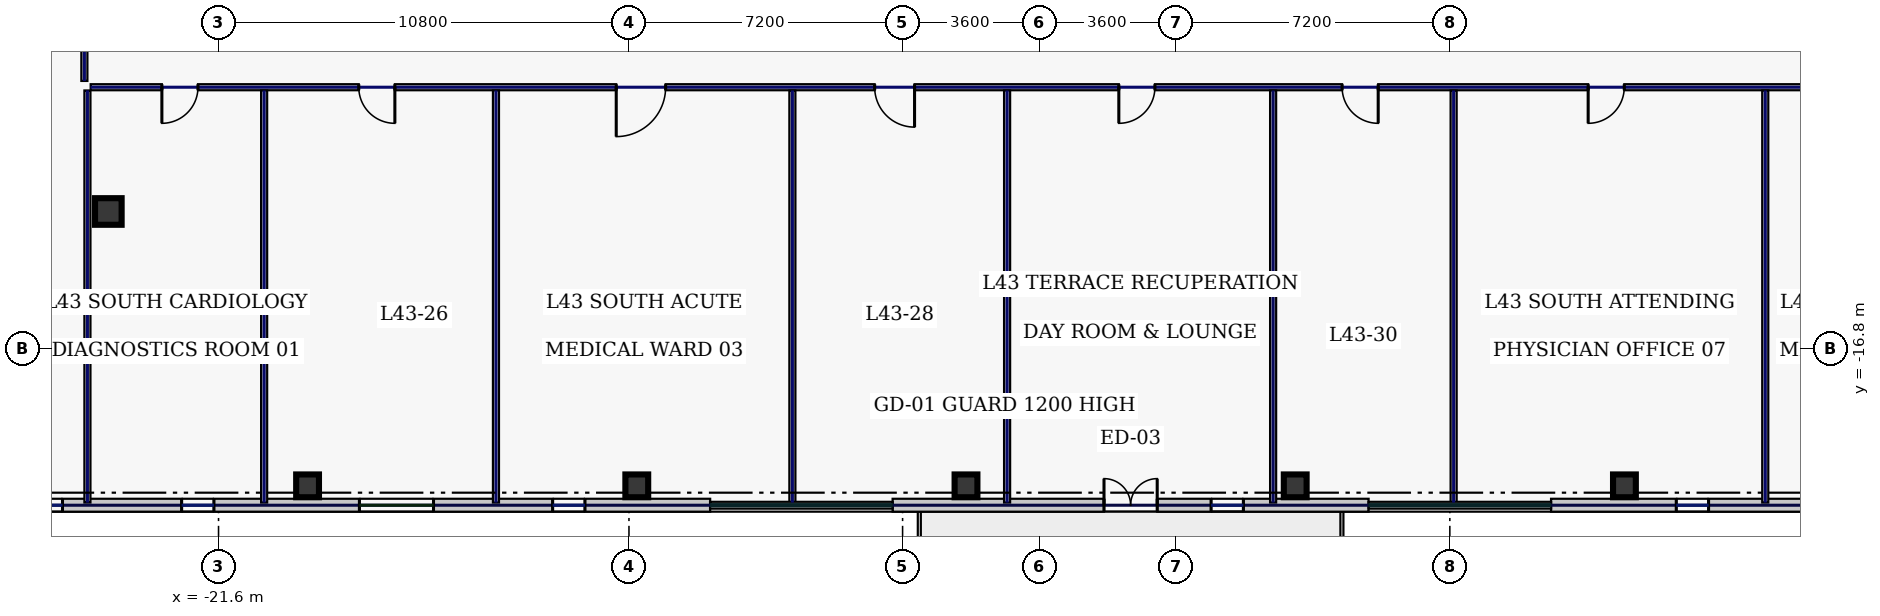
"""IFC4 building model, lengths in metres.
Left out: names, types, materials, properties, quantities, classifications, styles, units other than length and angle.
Written with IfcOpenShell. Run it as: python <this file> out.ifc"""

import sys

from ifc_helpers import new_model, si_unit, direction, frame, frame_2d, origin, origin_2d, place, context, subcontext, project, spatial, rectangle, hollow_rectangle, extrude, element, fill, save


model = new_model("IFC4")
c1 = context("Model", 3, precision=1e-05, world=origin(), true_north=direction((0.0, 1.0)))
c2 = subcontext(c1, "Body", "Model", "MODEL_VIEW")
j1 = project(units=[si_unit("LENGTHUNIT", "METRE"), si_unit("PLANEANGLEUNIT", "RADIAN")], contexts=[c1])
p1 = place(None, origin())
s1 = spatial("IfcSite", under=j1, at=p1, CompositionType="ELEMENT")
p2 = place(p1, origin())
s2 = spatial("IfcBuilding", under=s1, at=p2, CompositionType="ELEMENT")
p3 = place(p2, frame((0.0, 0.0, 188.2)))
s3 = spatial("IfcBuildingStorey", under=s2, at=p3, CompositionType="ELEMENT", Elevation=188.2)
p4 = place(p3, frame((-24.5, -13.2, 0.0), z_axis=(0.0, 0.0, 1.0), x_axis=(1.0, 0.0, 0.0)))
e1 = element("IfcColumn", 1, at=p4, inside=s3, PredefinedType="COLUMN", context=c2, shape_type="SweptSolid", body=[
    extrude(hollow_rectangle(XDim=0.7, YDim=0.7, WallThickness=0.032, at=origin_2d()), origin(), (0.0, 0.0, 1.0), 3.74),
])
for number, where, z_axis, x_axis in (
    (2, (-19.257, -20.42, 0.0), (0.0, 0.0, 1.0), (1.0, 0.0, 0.0)),
    (3, (-10.594, -20.42, 0.0), (0.0, 0.0, 1.0), (1.0, 0.0, 0.0)),
    (4, (-1.931, -20.42, 0.0), (0.0, 0.0, 1.0), (1.0, 0.0, 0.0)),
    (5, (6.731, -20.42, 0.0), (0.0, 0.0, 1.0), (1.0, 0.0, 0.0)),
    (6, (15.394, -20.42, 0.0), (0.0, 0.0, 1.0), (1.0, 0.0, 0.0)),
):
    element("IfcColumn", number, at=place(p3, frame(where, z_axis=z_axis, x_axis=x_axis)), inside=s3, PredefinedType="COLUMN", context=c2, shape_type="SweptSolid", body=[
        extrude(hollow_rectangle(XDim=0.6, YDim=0.6, WallThickness=0.028, at=origin_2d()), origin(), (0.0, 0.0, 1.0), 3.74),
    ])
p5 = place(p3, frame((-28.6, -20.93, 0.0), z_axis=(0.0, 0.0, 1.0), x_axis=(1.0, 0.0, 0.0)))
e7 = element("IfcWall", 7, at=p5, inside=s3, PredefinedType="STANDARD", context=c2, shape_type="SweptSolid", body=[
    extrude(rectangle(XDim=19.937, YDim=0.34, at=frame_2d((9.969, 0.0))), origin(), (0.0, 0.0, 1.0), 3.74),
])
p6 = place(p5, frame((2.044, 0.0, 0.8)))
e8 = element("IfcOpeningElement", 8, at=p6, cuts=e7, PredefinedType="OPENING", context=c2, shape_type="SweptSolid", body=[
    extrude(rectangle(XDim=0.85, YDim=1.85, at=frame_2d((0.425, 0.925))), frame((0.0, 0.18, 0.0), z_axis=(0.0, -1.0, 0.0), x_axis=(1.0, 0.0, 0.0)), (0.0, 0.0, 1.0), 0.36),
])
p7 = place(p5, frame((6.029, 0.0, 0.8)))
e9 = element("IfcOpeningElement", 9, at=p7, cuts=e7, PredefinedType="OPENING", context=c2, shape_type="SweptSolid", body=[
    extrude(rectangle(XDim=0.85, YDim=1.85, at=frame_2d((0.425, 0.925))), frame((0.0, 0.18, 0.0), z_axis=(0.0, -1.0, 0.0), x_axis=(1.0, 0.0, 0.0)), (0.0, 0.0, 1.0), 0.36),
])
p8 = place(p5, frame((10.707, 0.0, 0.8)))
e10 = element("IfcOpeningElement", 10, at=p8, cuts=e7, PredefinedType="OPENING", context=c2, shape_type="SweptSolid", body=[
    extrude(rectangle(XDim=1.95, YDim=2.1, at=frame_2d((0.975, 1.05))), frame((0.0, 0.18, 0.0), z_axis=(0.0, -1.0, 0.0), x_axis=(1.0, 0.0, 0.0)), (0.0, 0.0, 1.0), 0.36),
])
p9 = place(p5, frame((15.792, 0.0, 0.8)))
e11 = element("IfcOpeningElement", 11, at=p9, cuts=e7, PredefinedType="OPENING", context=c2, shape_type="SweptSolid", body=[
    extrude(rectangle(XDim=0.85, YDim=1.85, at=frame_2d((0.425, 0.925))), frame((0.0, 0.18, 0.0), z_axis=(0.0, -1.0, 0.0), x_axis=(1.0, 0.0, 0.0)), (0.0, 0.0, 1.0), 0.36),
])
p10 = place(p3, frame((-3.863, -20.93, 0.0), z_axis=(0.0, 0.0, 1.0), x_axis=(1.0, 0.0, 0.0)))
e12 = element("IfcWall", 12, at=p10, inside=s3, PredefinedType="STANDARD", context=c2, shape_type="SweptSolid", body=[
    extrude(rectangle(XDim=12.526, YDim=0.34, at=frame_2d((6.263, 0.0))), origin(), (0.0, 0.0, 1.0), 3.74),
])
p11 = place(p10, frame((5.563, 0.0, 0.0)))
e13 = element("IfcOpeningElement", 13, at=p11, cuts=e12, PredefinedType="OPENING", context=c2, shape_type="SweptSolid", body=[
    extrude(rectangle(XDim=1.4, YDim=2.2, at=frame_2d((0.7, 1.1))), frame((0.0, 0.18, 0.0), z_axis=(0.0, -1.0, 0.0), x_axis=(1.0, 0.0, 0.0)), (0.0, 0.0, 1.0), 0.36),
])
p12 = place(p10, frame((8.38, 0.0, 0.8)))
e14 = element("IfcOpeningElement", 14, at=p12, cuts=e12, PredefinedType="OPENING", context=c2, shape_type="SweptSolid", body=[
    extrude(rectangle(XDim=0.85, YDim=1.85, at=frame_2d((0.425, 0.925))), frame((0.0, 0.18, 0.0), z_axis=(0.0, -1.0, 0.0), x_axis=(1.0, 0.0, 0.0)), (0.0, 0.0, 1.0), 0.36),
])
p13 = place(p3, frame((13.463, -20.93, 0.0), z_axis=(0.0, 0.0, 1.0), x_axis=(1.0, 0.0, 0.0)))
e15 = element("IfcWall", 15, at=p13, inside=s3, PredefinedType="STANDARD", context=c2, shape_type="SweptSolid", body=[
    extrude(rectangle(XDim=19.937, YDim=0.34, at=frame_2d((9.969, 0.0))), origin(), (0.0, 0.0, 1.0), 3.74),
])
p14 = place(p13, frame((3.295, 0.0, 0.8)))
e16 = element("IfcOpeningElement", 16, at=p14, cuts=e15, PredefinedType="OPENING", context=c2, shape_type="SweptSolid", body=[
    extrude(rectangle(XDim=0.85, YDim=1.85, at=frame_2d((0.425, 0.925))), frame((0.0, 0.18, 0.0), z_axis=(0.0, -1.0, 0.0), x_axis=(1.0, 0.0, 0.0)), (0.0, 0.0, 1.0), 0.36),
])
p15 = place(p13, frame((7.28, 0.0, 0.8)))
e17 = element("IfcOpeningElement", 17, at=p15, cuts=e15, PredefinedType="OPENING", context=c2, shape_type="SweptSolid", body=[
    extrude(rectangle(XDim=1.95, YDim=2.1, at=frame_2d((0.975, 1.05))), frame((0.0, 0.18, 0.0), z_axis=(0.0, -1.0, 0.0), x_axis=(1.0, 0.0, 0.0)), (0.0, 0.0, 1.0), 0.36),
])
p16 = place(p13, frame((13.058, 0.0, 0.8)))
e18 = element("IfcOpeningElement", 18, at=p16, cuts=e15, PredefinedType="OPENING", context=c2, shape_type="SweptSolid", body=[
    extrude(rectangle(XDim=0.85, YDim=1.85, at=frame_2d((0.425, 0.925))), frame((0.0, 0.18, 0.0), z_axis=(0.0, -1.0, 0.0), x_axis=(1.0, 0.0, 0.0)), (0.0, 0.0, 1.0), 0.36),
])
p17 = place(p13, frame((15.943, 0.0, 0.8)))
e19 = element("IfcOpeningElement", 19, at=p17, cuts=e15, PredefinedType="OPENING", context=c2, shape_type="SweptSolid", body=[
    extrude(rectangle(XDim=1.95, YDim=2.1, at=frame_2d((0.975, 1.05))), frame((0.0, 0.18, 0.0), z_axis=(0.0, -1.0, 0.0), x_axis=(1.0, 0.0, 0.0)), (0.0, 0.0, 1.0), 0.36),
])
p18 = place(p3, frame((-25.13, -9.765, 0.0), z_axis=(0.0, 0.0, 1.0), x_axis=(0.0, 1.0, 0.0)))
e20 = element("IfcWall", 20, at=p18, inside=s3, PredefinedType="PARTITIONING", context=c2, shape_type="SweptSolid", body=[
    extrude(rectangle(XDim=2.98, YDim=0.16, at=frame_2d((1.49, 0.0))), origin(), (0.0, 0.0, 1.0), 3.74),
])
p19 = place(p18, frame((1.1, 0.0, 0.0)))
e21 = element("IfcOpeningElement", 21, at=p19, cuts=e20, PredefinedType="OPENING", context=c2, shape_type="SweptSolid", body=[
    extrude(rectangle(XDim=0.95, YDim=2.2, at=frame_2d((0.475, 1.1))), frame((0.0, 0.09, 0.0), z_axis=(0.0, -1.0, 0.0), x_axis=(1.0, 0.0, 0.0)), (0.0, 0.0, 1.0), 0.18),
])
p20 = place(p3, frame((24.965, -9.93, 0.0), z_axis=(0.0, 0.0, 1.0), x_axis=(-1.0, 0.0, 0.0)))
e22 = element("IfcWall", 22, at=p20, inside=s3, PredefinedType="PARTITIONING", context=c2, shape_type="SweptSolid", body=[
    extrude(rectangle(XDim=49.93, YDim=0.16, at=frame_2d((24.965, 0.0))), origin(), (0.0, 0.0, 1.0), 3.74),
])
p21 = place(p20, frame((47.106, 0.0, 0.0)))
e23 = element("IfcOpeningElement", 23, at=p21, cuts=e22, PredefinedType="OPENING", context=c2, shape_type="SweptSolid", body=[
    extrude(rectangle(XDim=0.95, YDim=2.2, at=frame_2d((0.475, 1.1))), frame((0.0, 0.09, 0.0), z_axis=(0.0, -1.0, 0.0), x_axis=(1.0, 0.0, 0.0)), (0.0, 0.0, 1.0), 0.18),
])
p22 = place(p20, frame((41.925, 0.0, 0.0)))
e24 = element("IfcOpeningElement", 24, at=p22, cuts=e22, PredefinedType="OPENING", context=c2, shape_type="SweptSolid", body=[
    extrude(rectangle(XDim=0.95, YDim=2.2, at=frame_2d((0.475, 1.1))), frame((0.0, 0.09, 0.0), z_axis=(0.0, -1.0, 0.0), x_axis=(1.0, 0.0, 0.0)), (0.0, 0.0, 1.0), 0.18),
])
p23 = place(p20, frame((34.8, 0.0, 0.0)))
e25 = element("IfcOpeningElement", 25, at=p23, cuts=e22, PredefinedType="OPENING", context=c2, shape_type="SweptSolid", body=[
    extrude(rectangle(XDim=1.3, YDim=2.2, at=frame_2d((0.65, 1.1))), frame((0.0, 0.09, 0.0), z_axis=(0.0, -1.0, 0.0), x_axis=(1.0, 0.0, 0.0)), (0.0, 0.0, 1.0), 0.18),
])
p24 = place(p20, frame((28.25, 0.0, 0.0)))
e26 = element("IfcOpeningElement", 26, at=p24, cuts=e22, PredefinedType="OPENING", context=c2, shape_type="SweptSolid", body=[
    extrude(rectangle(XDim=1.05, YDim=2.2, at=frame_2d((0.525, 1.1))), frame((0.0, 0.09, 0.0), z_axis=(0.0, -1.0, 0.0), x_axis=(1.0, 0.0, 0.0)), (0.0, 0.0, 1.0), 0.18),
])
p25 = place(p20, frame((21.925, 0.0, 0.0)))
e27 = element("IfcOpeningElement", 27, at=p25, cuts=e22, PredefinedType="OPENING", context=c2, shape_type="SweptSolid", body=[
    extrude(rectangle(XDim=0.95, YDim=2.2, at=frame_2d((0.475, 1.1))), frame((0.0, 0.09, 0.0), z_axis=(0.0, -1.0, 0.0), x_axis=(1.0, 0.0, 0.0)), (0.0, 0.0, 1.0), 0.18),
])
p26 = place(p20, frame((16.05, 0.0, 0.0)))
e28 = element("IfcOpeningElement", 28, at=p26, cuts=e22, PredefinedType="OPENING", context=c2, shape_type="SweptSolid", body=[
    extrude(rectangle(XDim=0.95, YDim=2.2, at=frame_2d((0.475, 1.1))), frame((0.0, 0.09, 0.0), z_axis=(0.0, -1.0, 0.0), x_axis=(1.0, 0.0, 0.0)), (0.0, 0.0, 1.0), 0.18),
])
p27 = place(p20, frame((9.575, 0.0, 0.0)))
e29 = element("IfcOpeningElement", 29, at=p27, cuts=e22, PredefinedType="OPENING", context=c2, shape_type="SweptSolid", body=[
    extrude(rectangle(XDim=0.95, YDim=2.2, at=frame_2d((0.475, 1.1))), frame((0.0, 0.09, 0.0), z_axis=(0.0, -1.0, 0.0), x_axis=(1.0, 0.0, 0.0)), (0.0, 0.0, 1.0), 0.18),
])
p28 = place(p20, frame((2.519, 0.0, 0.0)))
e30 = element("IfcOpeningElement", 30, at=p28, cuts=e22, PredefinedType="OPENING", context=c2, shape_type="SweptSolid", body=[
    extrude(rectangle(XDim=1.3, YDim=2.2, at=frame_2d((0.65, 1.1))), frame((0.0, 0.09, 0.0), z_axis=(0.0, -1.0, 0.0), x_axis=(1.0, 0.0, 0.0)), (0.0, 0.0, 1.0), 0.18),
])
for number, where, z_axis, x_axis in (
    (31, (-25.05, -20.86, 0.0), (0.0, 0.0, 1.0), (0.0, 1.0, 0.0)),
    (32, (-20.4, -20.86, 0.0), (0.0, 0.0, 1.0), (0.0, 1.0, 0.0)),
    (33, (-14.3, -20.86, 0.0), (0.0, 0.0, 1.0), (0.0, 1.0, 0.0)),
    (34, (-6.5, -20.86, 0.0), (0.0, 0.0, 1.0), (0.0, 1.0, 0.0)),
    (35, (-0.85, -20.86, 0.0), (0.0, 0.0, 1.0), (0.0, 1.0, 0.0)),
):
    element("IfcWall", number, at=place(p3, frame(where, z_axis=z_axis, x_axis=x_axis)), inside=s3, PredefinedType="PARTITIONING", context=c2, shape_type="SweptSolid", body=[
        extrude(rectangle(XDim=10.845, YDim=0.16, at=frame_2d((5.423, 0.0))), origin(), (0.0, 0.0, 1.0), 3.74),
    ])
p29 = place(p3, frame((6.15, -20.86, 0.0), z_axis=(0.0, 0.0, 1.0), x_axis=(0.0, 1.0, 0.0)))
e36 = element("IfcWall", 36, at=p29, inside=s3, PredefinedType="PARTITIONING", context=c2, shape_type="SweptSolid", body=[
    extrude(rectangle(XDim=10.845, YDim=0.16, at=frame_2d((5.423, 0.0))), origin(), (0.0, 0.0, 1.0), 3.285),
])
for number, where, z_axis, x_axis in (
    (37, (10.9, -20.86, 0.0), (0.0, 0.0, 1.0), (0.0, 1.0, 0.0)),
    (38, (19.1, -20.86, 0.0), (0.0, 0.0, 1.0), (0.0, 1.0, 0.0)),
):
    element("IfcWall", number, at=place(p3, frame(where, z_axis=z_axis, x_axis=x_axis)), inside=s3, PredefinedType="PARTITIONING", context=c2, shape_type="SweptSolid", body=[
        extrude(rectangle(XDim=10.845, YDim=0.16, at=frame_2d((5.423, 0.0))), origin(), (0.0, 0.0, 1.0), 3.74),
    ])
p30 = place(p6, origin())
e39 = element("IfcWindow", 39, at=p30, inside=s3, PartitioningType="SINGLE_PANEL", PredefinedType="WINDOW", context=c2, shape_type="SweptSolid", body=[
    extrude(rectangle(XDim=0.85, YDim=1.85, at=frame_2d((0.425, 0.925))), frame((0.0, 0.03, 0.0), z_axis=(0.0, -1.0, 0.0), x_axis=(1.0, 0.0, 0.0)), (0.0, 0.0, 1.0), 0.06),
])
fill(e8, e39)
p31 = place(p7, origin())
e40 = element("IfcWindow", 40, at=p31, inside=s3, PartitioningType="SINGLE_PANEL", PredefinedType="WINDOW", context=c2, shape_type="SweptSolid", body=[
    extrude(rectangle(XDim=0.85, YDim=1.85, at=frame_2d((0.425, 0.925))), frame((0.0, 0.03, 0.0), z_axis=(0.0, -1.0, 0.0), x_axis=(1.0, 0.0, 0.0)), (0.0, 0.0, 1.0), 0.06),
])
fill(e9, e40)
p32 = place(p8, origin())
e41 = element("IfcWindow", 41, at=p32, inside=s3, PartitioningType="SINGLE_PANEL", PredefinedType="WINDOW", context=c2, shape_type="SweptSolid", body=[
    extrude(rectangle(XDim=1.95, YDim=2.1, at=frame_2d((0.975, 1.05))), frame((0.0, 0.03, 0.0), z_axis=(0.0, -1.0, 0.0), x_axis=(1.0, 0.0, 0.0)), (0.0, 0.0, 1.0), 0.06),
])
fill(e10, e41)
p33 = place(p9, origin())
e42 = element("IfcWindow", 42, at=p33, inside=s3, PartitioningType="SINGLE_PANEL", PredefinedType="WINDOW", context=c2, shape_type="SweptSolid", body=[
    extrude(rectangle(XDim=0.85, YDim=1.85, at=frame_2d((0.425, 0.925))), frame((0.0, 0.03, 0.0), z_axis=(0.0, -1.0, 0.0), x_axis=(1.0, 0.0, 0.0)), (0.0, 0.0, 1.0), 0.06),
])
fill(e11, e42)
p34 = place(p11, origin())
e43 = element("IfcDoor", 43, at=p34, inside=s3, OperationType="DOUBLE_SWING_LEFT", PredefinedType="DOOR", context=c2, shape_type="SweptSolid", body=[
    extrude(rectangle(XDim=1.4, YDim=2.2, at=frame_2d((0.7, 1.1))), frame((0.0, 0.025, 0.0), z_axis=(0.0, -1.0, 0.0), x_axis=(1.0, 0.0, 0.0)), (0.0, 0.0, 1.0), 0.05),
])
fill(e13, e43)
p35 = place(p12, origin())
e44 = element("IfcWindow", 44, at=p35, inside=s3, PartitioningType="SINGLE_PANEL", PredefinedType="WINDOW", context=c2, shape_type="SweptSolid", body=[
    extrude(rectangle(XDim=0.85, YDim=1.85, at=frame_2d((0.425, 0.925))), frame((0.0, 0.03, 0.0), z_axis=(0.0, -1.0, 0.0), x_axis=(1.0, 0.0, 0.0)), (0.0, 0.0, 1.0), 0.06),
])
fill(e14, e44)
p36 = place(p14, origin())
e45 = element("IfcWindow", 45, at=p36, inside=s3, PartitioningType="SINGLE_PANEL", PredefinedType="WINDOW", context=c2, shape_type="SweptSolid", body=[
    extrude(rectangle(XDim=0.85, YDim=1.85, at=frame_2d((0.425, 0.925))), frame((0.0, 0.03, 0.0), z_axis=(0.0, -1.0, 0.0), x_axis=(1.0, 0.0, 0.0)), (0.0, 0.0, 1.0), 0.06),
])
fill(e16, e45)
p37 = place(p21, origin())
e46 = element("IfcDoor", 46, at=p37, inside=s3, OperationType="SINGLE_SWING_RIGHT", PredefinedType="DOOR", context=c2, shape_type="SweptSolid", body=[
    extrude(rectangle(XDim=0.95, YDim=2.2, at=frame_2d((0.475, 1.1))), frame((0.0, 0.025, 0.0), z_axis=(0.0, -1.0, 0.0), x_axis=(1.0, 0.0, 0.0)), (0.0, 0.0, 1.0), 0.05),
])
fill(e23, e46)
p38 = place(p22, origin())
e47 = element("IfcDoor", 47, at=p38, inside=s3, OperationType="SINGLE_SWING_LEFT", PredefinedType="DOOR", context=c2, shape_type="SweptSolid", body=[
    extrude(rectangle(XDim=0.95, YDim=2.2, at=frame_2d((0.475, 1.1))), frame((0.0, 0.025, 0.0), z_axis=(0.0, -1.0, 0.0), x_axis=(1.0, 0.0, 0.0)), (0.0, 0.0, 1.0), 0.05),
])
fill(e24, e47)
p39 = place(p23, origin())
e48 = element("IfcDoor", 48, at=p39, inside=s3, OperationType="SINGLE_SWING_RIGHT", PredefinedType="DOOR", context=c2, shape_type="SweptSolid", body=[
    extrude(rectangle(XDim=1.3, YDim=2.2, at=frame_2d((0.65, 1.1))), frame((0.0, 0.025, 0.0), z_axis=(0.0, -1.0, 0.0), x_axis=(1.0, 0.0, 0.0)), (0.0, 0.0, 1.0), 0.05),
])
fill(e25, e48)
p40 = place(p24, origin())
e49 = element("IfcDoor", 49, at=p40, inside=s3, OperationType="SINGLE_SWING_LEFT", PredefinedType="DOOR", context=c2, shape_type="SweptSolid", body=[
    extrude(rectangle(XDim=1.05, YDim=2.2, at=frame_2d((0.525, 1.1))), frame((0.0, 0.025, 0.0), z_axis=(0.0, -1.0, 0.0), x_axis=(1.0, 0.0, 0.0)), (0.0, 0.0, 1.0), 0.05),
])
fill(e26, e49)
p41 = place(p25, origin())
e50 = element("IfcDoor", 50, at=p41, inside=s3, OperationType="SINGLE_SWING_RIGHT", PredefinedType="DOOR", context=c2, shape_type="SweptSolid", body=[
    extrude(rectangle(XDim=0.95, YDim=2.2, at=frame_2d((0.475, 1.1))), frame((0.0, 0.025, 0.0), z_axis=(0.0, -1.0, 0.0), x_axis=(1.0, 0.0, 0.0)), (0.0, 0.0, 1.0), 0.05),
])
fill(e27, e50)
p42 = place(p26, origin())
e51 = element("IfcDoor", 51, at=p42, inside=s3, OperationType="SINGLE_SWING_LEFT", PredefinedType="DOOR", context=c2, shape_type="SweptSolid", body=[
    extrude(rectangle(XDim=0.95, YDim=2.2, at=frame_2d((0.475, 1.1))), frame((0.0, 0.025, 0.0), z_axis=(0.0, -1.0, 0.0), x_axis=(1.0, 0.0, 0.0)), (0.0, 0.0, 1.0), 0.05),
])
fill(e28, e51)
p43 = place(p27, origin())
e52 = element("IfcDoor", 52, at=p43, inside=s3, OperationType="SINGLE_SWING_RIGHT", PredefinedType="DOOR", context=c2, shape_type="SweptSolid", body=[
    extrude(rectangle(XDim=0.95, YDim=2.2, at=frame_2d((0.475, 1.1))), frame((0.0, 0.025, 0.0), z_axis=(0.0, -1.0, 0.0), x_axis=(1.0, 0.0, 0.0)), (0.0, 0.0, 1.0), 0.05),
])
fill(e29, e52)
save(model, sys.argv[1])
